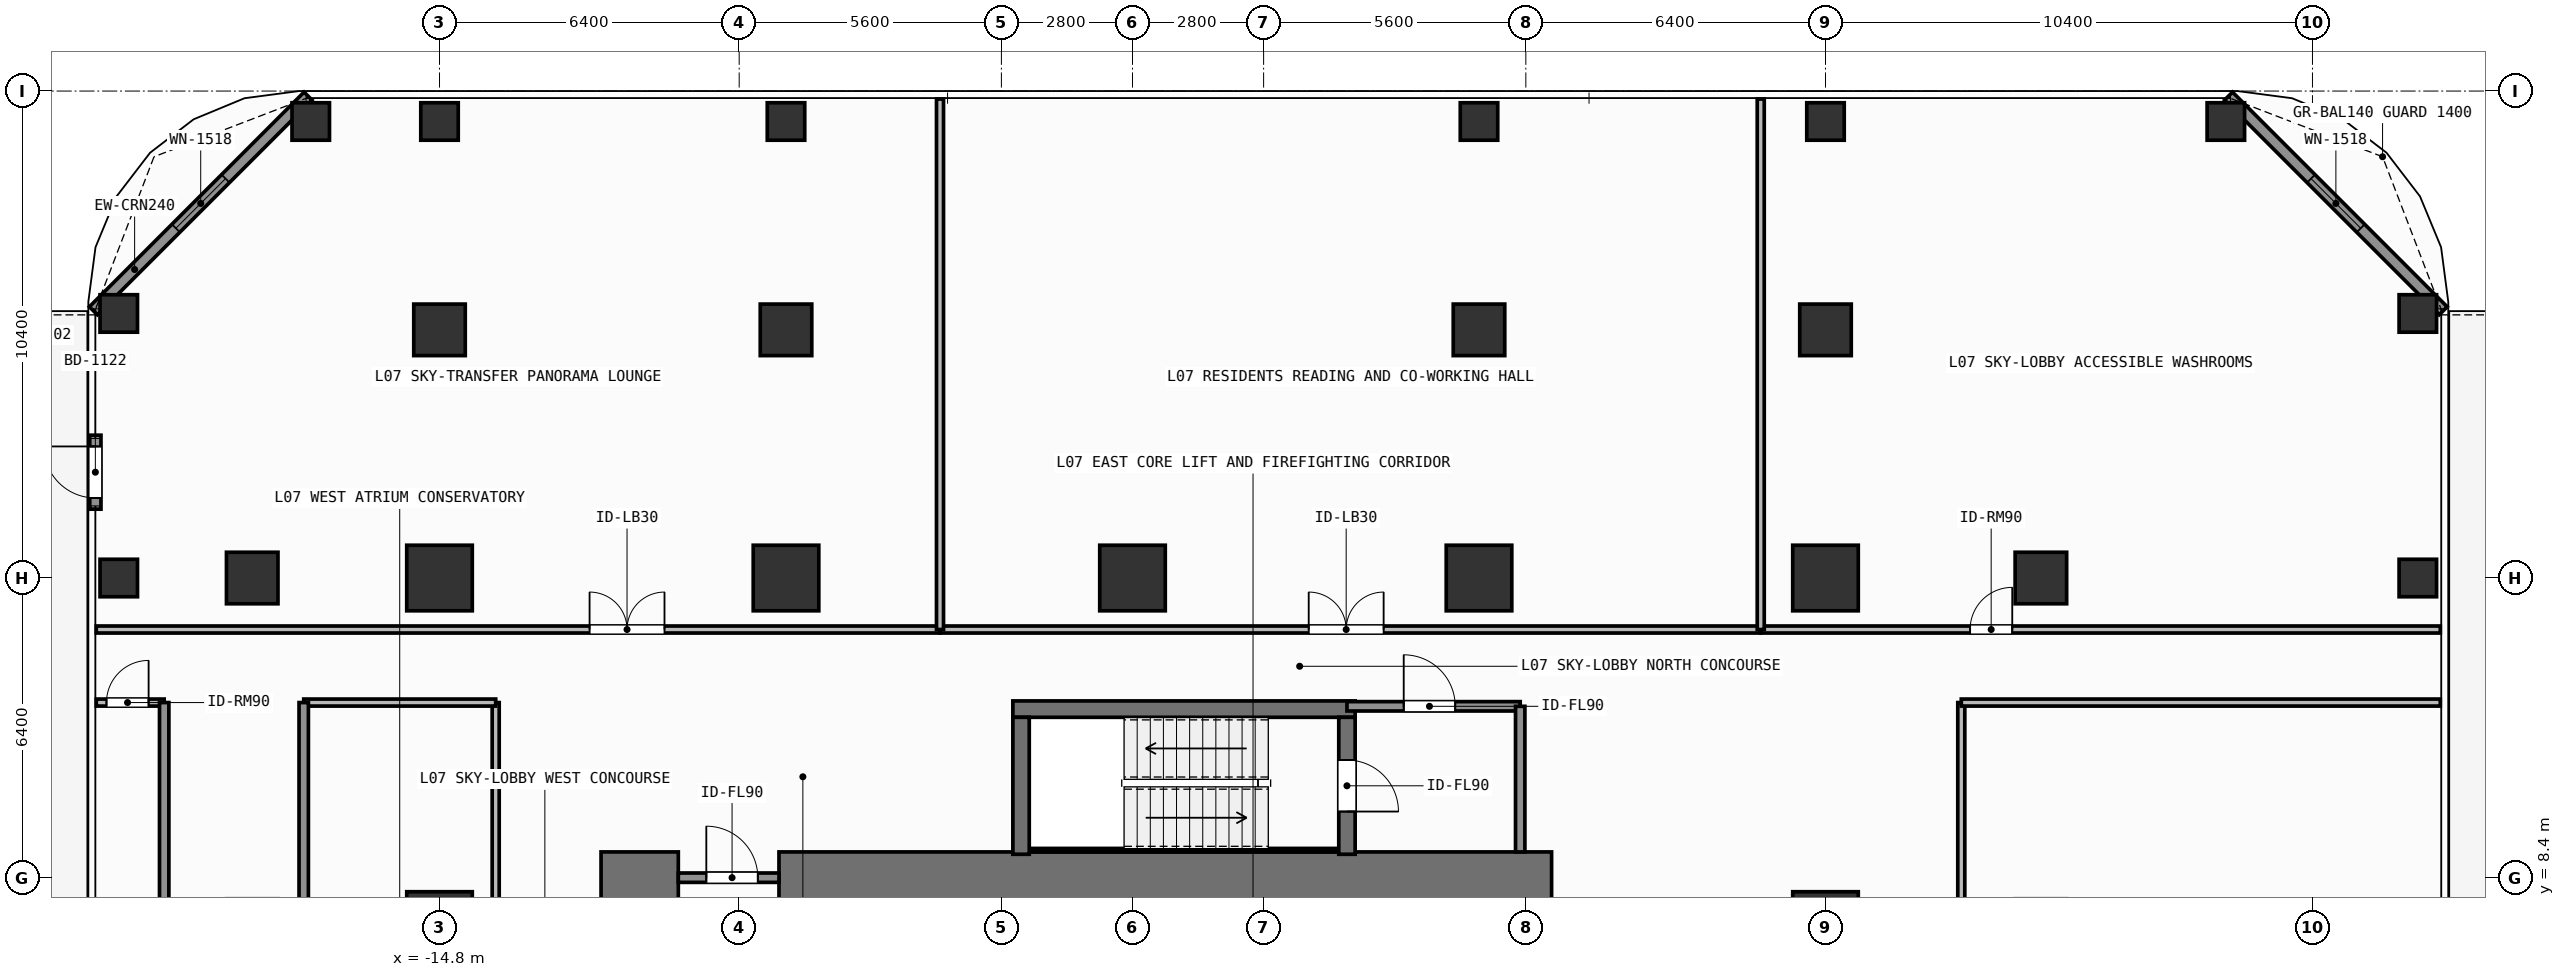
"""IFC4 building model, lengths in metres.
Left out: names, types, materials, properties, quantities, classifications, styles, units other than length and angle.
Written with IfcOpenShell. Run it as: python <this file> out.ifc"""

import sys

from ifc_helpers import new_model, si_unit, direction, frame, frame_2d, origin, origin_2d, place, context, subcontext, project, spatial, rectangle, hollow_rectangle, extrude, element, fill, save


model = new_model("IFC4")
c1 = context("Model", 3, precision=1e-05, world=origin(), true_north=direction((0.0, 1.0)))
c2 = subcontext(c1, "Body", "Model", "MODEL_VIEW")
j1 = project(units=[si_unit("LENGTHUNIT", "METRE"), si_unit("PLANEANGLEUNIT", "RADIAN")], contexts=[c1])
p1 = place(None, origin())
s1 = spatial("IfcSite", under=j1, at=p1, CompositionType="ELEMENT")
p2 = place(p1, origin())
s2 = spatial("IfcBuilding", under=s1, at=p2, CompositionType="ELEMENT")
p3 = place(p2, frame((0.0, 0.0, 26.4)))
s3 = spatial("IfcBuildingStorey", under=s2, at=p3, CompositionType="ELEMENT", Elevation=26.4)
p4 = place(p3, frame((-11.35, 8.4, 0.0), z_axis=(0.0, 0.0, 1.0), x_axis=(1.0, 0.0, 0.0)))
e1 = element("IfcWall", 1, at=p4, inside=s3, PredefinedType="SHEAR", context=c2, shape_type="SweptSolid", body=[
    extrude(rectangle(XDim=1.65, YDim=1.1, at=frame_2d((0.825, 0.0))), origin(), (0.0, 0.0, 1.0), 4.2),
])
p5 = place(p3, frame((-7.55, 8.4, 0.0), z_axis=(0.0, 0.0, 1.0), x_axis=(1.0, 0.0, 0.0)))
e2 = element("IfcWall", 2, at=p5, inside=s3, PredefinedType="SHEAR", context=c2, shape_type="SweptSolid", body=[
    extrude(rectangle(XDim=16.5, YDim=1.1, at=frame_2d((8.25, 0.0))), origin(), (0.0, 0.0, 1.0), 4.2),
])
p6 = place(p3, frame((-2.555, 12.0, 0.0), z_axis=(0.0, 0.0, 1.0), x_axis=(1.0, 0.0, 0.0)))
e3 = element("IfcWall", 3, at=p6, inside=s3, PredefinedType="SHEAR", context=c2, shape_type="SweptSolid", body=[
    extrude(rectangle(XDim=7.31, YDim=0.35, at=frame_2d((3.655, 0.0))), origin(), (0.0, 0.0, 1.0), 4.2),
])
p7 = place(p3, frame((-2.2, 8.988, 0.0), z_axis=(0.0, 0.0, 1.0), x_axis=(1.0, 0.0, 0.0)))
e4 = element("IfcWall", 4, at=p7, inside=s3, PredefinedType="SHEAR", context=c2, shape_type="SweptSolid", body=[
    extrude(rectangle(XDim=6.6, YDim=0.075, at=frame_2d((3.3, 0.0))), origin(), (0.0, 0.0, 1.0), 4.2),
])
p8 = place(p3, frame((-2.38, 8.9, 0.0), z_axis=(0.0, 0.0, 1.0), x_axis=(0.0, 1.0, 0.0)))
e5 = element("IfcWall", 5, at=p8, inside=s3, PredefinedType="SHEAR", context=c2, shape_type="SweptSolid", body=[
    extrude(rectangle(XDim=2.925, YDim=0.35, at=frame_2d((1.462, 0.0))), origin(), (0.0, 0.0, 1.0), 4.2),
])
p9 = place(p3, frame((4.58, 11.825, 0.0), z_axis=(0.0, 0.0, 1.0), x_axis=(0.0, -1.0, 0.0)))
e6 = element("IfcWall", 6, at=p9, inside=s3, PredefinedType="SHEAR", context=c2, shape_type="SweptSolid", body=[
    extrude(rectangle(XDim=2.925, YDim=0.35, at=frame_2d((1.462, 0.0))), origin(), (0.0, 0.0, 1.0), 4.2),
])
p10 = place(p9, frame((0.913, 0.0, 0.0)))
e7 = element("IfcOpeningElement", 7, at=p10, cuts=e6, PredefinedType="OPENING", context=c2, shape_type="SweptSolid", body=[
    extrude(rectangle(XDim=1.1, YDim=2.15, at=frame_2d((0.55, 1.075))), frame((0.0, 0.185, 0.0), z_axis=(0.0, -1.0, 0.0), x_axis=(1.0, 0.0, 0.0)), (0.0, 0.0, 1.0), 0.37),
])
for number, where, z_axis, x_axis in (
    (8, (-14.8, 14.8, 0.0), (0.0, 0.0, 1.0), (1.0, 0.0, 0.0)),
    (9, (-7.4, 14.8, 0.0), (0.0, 0.0, 1.0), (1.0, 0.0, 0.0)),
    (10, (0.0, 14.8, 0.0), (0.0, 0.0, 1.0), (1.0, 0.0, 0.0)),
    (11, (7.4, 14.8, 0.0), (0.0, 0.0, 1.0), (1.0, 0.0, 0.0)),
    (12, (14.8, 14.8, 0.0), (0.0, 0.0, 1.0), (1.0, 0.0, 0.0)),
    (13, (-14.8, 7.4, 0.0), (0.0, 0.0, 1.0), (1.0, 0.0, 0.0)),
    (14, (14.8, 7.4, 0.0), (0.0, 0.0, 1.0), (1.0, 0.0, 0.0)),
):
    element("IfcColumn", number, at=place(p3, frame(where, z_axis=z_axis, x_axis=x_axis)), inside=s3, PredefinedType="COLUMN", context=c2, shape_type="SweptSolid", body=[
        extrude(rectangle(XDim=1.4, YDim=1.4, at=origin_2d()), origin(), (0.0, 0.0, 1.0), 4.2),
    ])
for number, where, z_axis, x_axis in (
    (15, (-18.8, 14.8, 0.0), (0.0, 0.0, 1.0), (1.0, 0.0, 0.0)),
    (16, (19.4, 14.8, 0.0), (0.0, 0.0, 1.0), (1.0, 0.0, 0.0)),
    (17, (-14.8, 20.1, 0.0), (0.0, 0.0, 1.0), (1.0, 0.0, 0.0)),
    (18, (-7.4, 20.1, 0.0), (0.0, 0.0, 1.0), (1.0, 0.0, 0.0)),
    (19, (7.4, 20.1, 0.0), (0.0, 0.0, 1.0), (1.0, 0.0, 0.0)),
    (20, (14.8, 20.1, 0.0), (0.0, 0.0, 1.0), (1.0, 0.0, 0.0)),
):
    element("IfcColumn", number, at=place(p3, frame(where, z_axis=z_axis, x_axis=x_axis)), inside=s3, PredefinedType="COLUMN", context=c2, shape_type="SweptSolid", body=[
        extrude(rectangle(XDim=1.1, YDim=1.1, at=origin_2d()), origin(), (0.0, 0.0, 1.0), 4.2),
    ])
for number, where, z_axis, x_axis in (
    (21, (-17.55, 24.55, 0.0), (0.0, 0.0, 1.0), (1.0, 0.0, 0.0)),
    (22, (23.35, 24.55, 0.0), (0.0, 0.0, 1.0), (1.0, 0.0, 0.0)),
    (23, (-21.65, 20.45, 0.0), (0.0, 0.0, 1.0), (1.0, 0.0, 0.0)),
    (24, (27.45, 20.45, 0.0), (0.0, 0.0, 1.0), (1.0, 0.0, 0.0)),
    (25, (-14.8, 24.55, 0.0), (0.0, 0.0, 1.0), (1.0, 0.0, 0.0)),
    (26, (-7.4, 24.55, 0.0), (0.0, 0.0, 1.0), (1.0, 0.0, 0.0)),
    (27, (7.4, 24.55, 0.0), (0.0, 0.0, 1.0), (1.0, 0.0, 0.0)),
    (28, (14.8, 24.55, 0.0), (0.0, 0.0, 1.0), (1.0, 0.0, 0.0)),
    (29, (-21.65, 14.8, 0.0), (0.0, 0.0, 1.0), (1.0, 0.0, 0.0)),
    (30, (27.45, 14.8, 0.0), (0.0, 0.0, 1.0), (1.0, 0.0, 0.0)),
):
    element("IfcColumn", number, at=place(p3, frame(where, z_axis=z_axis, x_axis=x_axis)), inside=s3, PredefinedType="COLUMN", context=c2, shape_type="SweptSolid", body=[
        extrude(hollow_rectangle(XDim=0.8, YDim=0.8, WallThickness=0.036, at=origin_2d()), origin(), (0.0, 0.0, 1.0), 4.2),
    ])
p11 = place(p3, frame((-22.15, 16.27, 0.0), z_axis=(0.0, 0.0, 1.0), x_axis=(0.0, 1.0, 0.0)))
e31 = element("IfcWall", 31, at=p11, inside=s3, PredefinedType="SOLIDWALL", context=c2, shape_type="SweptSolid", body=[
    extrude(rectangle(XDim=1.58, YDim=0.24, at=frame_2d((0.79, 0.0))), origin(), (0.0, 0.0, 1.0), 3.98),
])
p12 = place(p11, frame((0.24, 0.0, 0.0)))
e32 = element("IfcOpeningElement", 32, at=p12, cuts=e31, PredefinedType="OPENING", context=c2, shape_type="SweptSolid", body=[
    extrude(rectangle(XDim=1.1, YDim=2.2, at=frame_2d((0.55, 1.1))), frame((0.0, 0.13, 0.0), z_axis=(0.0, -1.0, 0.0), x_axis=(1.0, 0.0, 0.0)), (0.0, 0.0, 1.0), 0.26),
])
p13 = place(p3, frame((-22.192, 20.508, 0.0), z_axis=(0.0, 0.0, 1.0), x_axis=(0.707106781187, 0.707106781187, 0.0)))
e33 = element("IfcWall", 33, at=p13, inside=s3, PredefinedType="SOLIDWALL", context=c2, shape_type="SweptSolid", body=[
    extrude(rectangle(XDim=6.484, YDim=0.24, at=frame_2d((3.242, 0.0))), origin(), (0.0, 0.0, 1.0), 3.98),
])
p14 = place(p13, frame((2.492, 0.0, 0.8)))
e34 = element("IfcOpeningElement", 34, at=p14, cuts=e33, PredefinedType="OPENING", context=c2, shape_type="SweptSolid", body=[
    extrude(rectangle(XDim=1.5, YDim=1.85, at=frame_2d((0.75, 0.925))), frame((0.0, 0.13, 0.0), z_axis=(0.0, -1.0, 0.0), x_axis=(1.0, 0.0, 0.0)), (0.0, 0.0, 1.0), 0.26),
])
p15 = place(p3, frame((23.408, 25.092, 0.0), z_axis=(0.0, 0.0, 1.0), x_axis=(0.707106781187, -0.707106781187, 0.0)))
e35 = element("IfcWall", 35, at=p15, inside=s3, PredefinedType="SOLIDWALL", context=c2, shape_type="SweptSolid", body=[
    extrude(rectangle(XDim=6.484, YDim=0.24, at=frame_2d((3.242, 0.0))), origin(), (0.0, 0.0, 1.0), 3.98),
])
p16 = place(p15, frame((2.492, 0.0, 0.8)))
e36 = element("IfcOpeningElement", 36, at=p16, cuts=e35, PredefinedType="OPENING", context=c2, shape_type="SweptSolid", body=[
    extrude(rectangle(XDim=1.5, YDim=1.85, at=frame_2d((0.75, 0.925))), frame((0.0, 0.13, 0.0), z_axis=(0.0, -1.0, 0.0), x_axis=(1.0, 0.0, 0.0)), (0.0, 0.0, 1.0), 0.26),
])
p17 = place(p3, frame((4.58, 12.06, 0.0), z_axis=(0.0, 0.0, 1.0), x_axis=(1.0, 0.0, 0.0)))
e37 = element("IfcWall", 37, at=p17, inside=s3, PredefinedType="SOLIDWALL", context=c2, shape_type="SweptSolid", body=[
    extrude(rectangle(XDim=3.7, YDim=0.2, at=frame_2d((1.85, 0.0))), origin(), (0.0, 0.0, 1.0), 3.98),
])
p18 = place(p17, frame((1.212, 0.0, 0.0)))
e38 = element("IfcOpeningElement", 38, at=p18, cuts=e37, PredefinedType="OPENING", context=c2, shape_type="SweptSolid", body=[
    extrude(rectangle(XDim=1.1, YDim=2.15, at=frame_2d((0.55, 1.075))), frame((0.0, 0.11, 0.0), z_axis=(0.0, -1.0, 0.0), x_axis=(1.0, 0.0, 0.0)), (0.0, 0.0, 1.0), 0.22),
])
p19 = place(p3, frame((-9.7, 8.4, 0.0), z_axis=(0.0, 0.0, 1.0), x_axis=(1.0, 0.0, 0.0)))
e39 = element("IfcWall", 39, at=p19, inside=s3, PredefinedType="SOLIDWALL", context=c2, shape_type="SweptSolid", body=[
    extrude(rectangle(XDim=2.15, YDim=0.2, at=frame_2d((1.075, 0.0))), origin(), (0.0, 0.0, 1.0), 3.02),
])
p20 = place(p19, frame((0.598, 0.0, 0.0)))
e40 = element("IfcOpeningElement", 40, at=p20, cuts=e39, PredefinedType="OPENING", context=c2, shape_type="SweptSolid", body=[
    extrude(rectangle(XDim=1.1, YDim=2.15, at=frame_2d((0.55, 1.075))), frame((0.0, 0.11, 0.0), z_axis=(0.0, -1.0, 0.0), x_axis=(1.0, 0.0, 0.0)), (0.0, 0.0, 1.0), 0.22),
])
p21 = place(p3, frame((-22.13, 13.7, 0.0), z_axis=(0.0, 0.0, 1.0), x_axis=(1.0, 0.0, 0.0)))
e41 = element("IfcWall", 41, at=p21, inside=s3, PredefinedType="PARTITIONING", context=c2, shape_type="SweptSolid", body=[
    extrude(rectangle(XDim=18.019, YDim=0.15, at=frame_2d((9.009, 0.0))), origin(), (0.0, 0.0, 1.0), 3.98),
])
p22 = place(p21, frame((10.535, 0.0, 0.0)))
e42 = element("IfcOpeningElement", 42, at=p22, cuts=e41, PredefinedType="OPENING", context=c2, shape_type="SweptSolid", body=[
    extrude(rectangle(XDim=1.6, YDim=2.3, at=frame_2d((0.8, 1.15))), frame((0.0, 0.085, 0.0), z_axis=(0.0, -1.0, 0.0), x_axis=(1.0, 0.0, 0.0)), (0.0, 0.0, 1.0), 0.17),
])
p23 = place(p3, frame((-4.111, 13.7, 0.0), z_axis=(0.0, 0.0, 1.0), x_axis=(1.0, 0.0, 0.0)))
e43 = element("IfcWall", 43, at=p23, inside=s3, PredefinedType="PARTITIONING", context=c2, shape_type="SweptSolid", body=[
    extrude(rectangle(XDim=17.528, YDim=0.15, at=frame_2d((8.764, 0.0))), origin(), (0.0, 0.0, 1.0), 3.98),
])
p24 = place(p23, frame((7.874, 0.0, 0.0)))
e44 = element("IfcOpeningElement", 44, at=p24, cuts=e43, PredefinedType="OPENING", context=c2, shape_type="SweptSolid", body=[
    extrude(rectangle(XDim=1.6, YDim=2.3, at=frame_2d((0.8, 1.15))), frame((0.0, 0.085, 0.0), z_axis=(0.0, -1.0, 0.0), x_axis=(1.0, 0.0, 0.0)), (0.0, 0.0, 1.0), 0.17),
])
p25 = place(p3, frame((13.417, 13.7, 0.0), z_axis=(0.0, 0.0, 1.0), x_axis=(1.0, 0.0, 0.0)))
e45 = element("IfcWall", 45, at=p25, inside=s3, PredefinedType="PARTITIONING", context=c2, shape_type="SweptSolid", body=[
    extrude(rectangle(XDim=14.513, YDim=0.15, at=frame_2d((7.256, 0.0))), origin(), (0.0, 0.0, 1.0), 3.98),
])
p26 = place(p25, frame((4.471, 0.0, 0.0)))
e46 = element("IfcOpeningElement", 46, at=p26, cuts=e45, PredefinedType="OPENING", context=c2, shape_type="SweptSolid", body=[
    extrude(rectangle(XDim=0.9, YDim=2.1, at=frame_2d((0.45, 1.05))), frame((0.0, 0.085, 0.0), z_axis=(0.0, -1.0, 0.0), x_axis=(1.0, 0.0, 0.0)), (0.0, 0.0, 1.0), 0.17),
])
p27 = place(p3, frame((-13.6, -12.14, 0.0), z_axis=(0.0, 0.0, 1.0), x_axis=(0.0, 1.0, 0.0)))
e47 = element("IfcWall", 47, at=p27, inside=s3, PredefinedType="PARTITIONING", context=c2, shape_type="SweptSolid", body=[
    extrude(rectangle(XDim=24.28, YDim=0.15, at=frame_2d((12.14, 0.0))), origin(), (0.0, 0.0, 1.0), 3.98),
])
p28 = place(p27, frame((11.25, 0.0, 0.0)))
e48 = element("IfcOpeningElement", 48, at=p28, cuts=e47, PredefinedType="OPENING", context=c2, shape_type="SweptSolid", body=[
    extrude(rectangle(XDim=1.6, YDim=2.3, at=frame_2d((0.8, 1.15))), frame((0.0, 0.085, 0.0), z_axis=(0.0, -1.0, 0.0), x_axis=(1.0, 0.0, 0.0)), (0.0, 0.0, 1.0), 0.17),
])
p29 = place(p3, frame((-22.13, 12.14, 0.0), z_axis=(0.0, 0.0, 1.0), x_axis=(1.0, 0.0, 0.0)))
e49 = element("IfcWall", 49, at=p29, inside=s3, PredefinedType="PARTITIONING", context=c2, shape_type="SweptSolid", body=[
    extrude(rectangle(XDim=1.45, YDim=0.15, at=frame_2d((0.725, 0.0))), origin(), (0.0, 0.0, 1.0), 3.98),
])
p30 = place(p29, frame((0.218, 0.0, 0.0)))
e50 = element("IfcOpeningElement", 50, at=p30, cuts=e49, PredefinedType="OPENING", context=c2, shape_type="SweptSolid", body=[
    extrude(rectangle(XDim=0.9, YDim=2.1, at=frame_2d((0.45, 1.05))), frame((0.0, 0.085, 0.0), z_axis=(0.0, -1.0, 0.0), x_axis=(1.0, 0.0, 0.0)), (0.0, 0.0, 1.0), 0.17),
])
p31 = place(p3, frame((17.7, -12.14, 0.0), z_axis=(0.0, 0.0, 1.0), x_axis=(0.0, 1.0, 0.0)))
e51 = element("IfcWall", 51, at=p31, inside=s3, PredefinedType="PARTITIONING", context=c2, shape_type="SweptSolid", body=[
    extrude(rectangle(XDim=24.28, YDim=0.15, at=frame_2d((12.14, 0.0))), origin(), (0.0, 0.0, 1.0), 3.98),
])
p32 = place(p31, frame((11.25, 0.0, 0.0)))
e52 = element("IfcOpeningElement", 52, at=p32, cuts=e51, PredefinedType="OPENING", context=c2, shape_type="SweptSolid", body=[
    extrude(rectangle(XDim=1.6, YDim=2.3, at=frame_2d((0.8, 1.15))), frame((0.0, 0.085, 0.0), z_axis=(0.0, -1.0, 0.0), x_axis=(1.0, 0.0, 0.0)), (0.0, 0.0, 1.0), 0.17),
])
p33 = place(p3, frame((8.28, 8.95, 0.0), z_axis=(0.0, 0.0, 1.0), x_axis=(0.0, 1.0, 0.0)))
e53 = element("IfcWall", 53, at=p33, inside=s3, PredefinedType="SOLIDWALL", context=c2, shape_type="SweptSolid", body=[
    extrude(rectangle(XDim=3.11, YDim=0.2, at=frame_2d((1.555, 0.0))), origin(), (0.0, 0.0, 1.0), 3.98),
])
for number, where, z_axis, x_axis in (
    (54, (-4.111, 13.7, 0.0), (0.0, 0.0, 1.0), (0.0, 1.0, 0.0)),
    (55, (13.417, 13.7, 0.0), (0.0, 0.0, 1.0), (0.0, 1.0, 0.0)),
):
    element("IfcWall", number, at=place(p3, frame(where, z_axis=z_axis, x_axis=x_axis)), inside=s3, PredefinedType="PARTITIONING", context=c2, shape_type="SweptSolid", body=[
        extrude(rectangle(XDim=11.33, YDim=0.15, at=frame_2d((5.665, 0.0))), origin(), (0.0, 0.0, 1.0), 3.98),
    ])
p34 = place(p3, frame((-17.7, 12.14, 0.0), z_axis=(0.0, 0.0, 1.0), x_axis=(1.0, 0.0, 0.0)))
e56 = element("IfcWall", 56, at=p34, inside=s3, PredefinedType="PARTITIONING", context=c2, shape_type="SweptSolid", body=[
    extrude(rectangle(XDim=4.1, YDim=0.15, at=frame_2d((2.05, 0.0))), origin(), (0.0, 0.0, 1.0), 3.98),
])
for number, where, z_axis, x_axis in (
    (57, (-17.7, -12.14, 0.0), (0.0, 0.0, 1.0), (0.0, 1.0, 0.0)),
    (58, (-20.68, -12.14, 0.0), (0.0, 0.0, 1.0), (0.0, 1.0, 0.0)),
):
    element("IfcWall", number, at=place(p3, frame(where, z_axis=z_axis, x_axis=x_axis)), inside=s3, PredefinedType="SOLIDWALL", context=c2, shape_type="SweptSolid", body=[
        extrude(rectangle(XDim=24.28, YDim=0.2, at=frame_2d((12.14, 0.0))), origin(), (0.0, 0.0, 1.0), 3.98),
    ])
p35 = place(p3, frame((17.7, 12.14, 0.0), z_axis=(0.0, 0.0, 1.0), x_axis=(1.0, 0.0, 0.0)))
e59 = element("IfcWall", 59, at=p35, inside=s3, PredefinedType="PARTITIONING", context=c2, shape_type="SweptSolid", body=[
    extrude(rectangle(XDim=10.23, YDim=0.15, at=frame_2d((5.115, 0.0))), origin(), (0.0, 0.0, 1.0), 3.98),
])
p36 = place(p12, origin())
e60 = element("IfcDoor", 60, at=p36, inside=s3, OperationType="SINGLE_SWING_RIGHT", PredefinedType="DOOR", context=c2, shape_type="SweptSolid", body=[
    extrude(rectangle(XDim=1.1, YDim=2.2, at=frame_2d((0.55, 1.1))), frame((0.0, 0.025, 0.0), z_axis=(0.0, -1.0, 0.0), x_axis=(1.0, 0.0, 0.0)), (0.0, 0.0, 1.0), 0.05),
])
fill(e32, e60)
p37 = place(p14, origin())
e61 = element("IfcWindow", 61, at=p37, inside=s3, PartitioningType="SINGLE_PANEL", PredefinedType="WINDOW", context=c2, shape_type="SweptSolid", body=[
    extrude(rectangle(XDim=1.5, YDim=1.85, at=frame_2d((0.75, 0.925))), frame((0.0, 0.03, 0.0), z_axis=(0.0, -1.0, 0.0), x_axis=(1.0, 0.0, 0.0)), (0.0, 0.0, 1.0), 0.06),
])
fill(e34, e61)
p38 = place(p16, origin())
e62 = element("IfcWindow", 62, at=p38, inside=s3, PartitioningType="SINGLE_PANEL", PredefinedType="WINDOW", context=c2, shape_type="SweptSolid", body=[
    extrude(rectangle(XDim=1.5, YDim=1.85, at=frame_2d((0.75, 0.925))), frame((0.0, 0.03, 0.0), z_axis=(0.0, -1.0, 0.0), x_axis=(1.0, 0.0, 0.0)), (0.0, 0.0, 1.0), 0.06),
])
fill(e36, e62)
p39 = place(p10, origin())
e63 = element("IfcDoor", 63, at=p39, inside=s3, OperationType="SINGLE_SWING_RIGHT", PredefinedType="DOOR", context=c2, shape_type="SweptSolid", body=[
    extrude(rectangle(XDim=1.1, YDim=2.15, at=frame_2d((0.55, 1.075))), frame((0.0, 0.025, 0.0), z_axis=(0.0, -1.0, 0.0), x_axis=(1.0, 0.0, 0.0)), (0.0, 0.0, 1.0), 0.05),
])
fill(e7, e63)
p40 = place(p18, origin())
e64 = element("IfcDoor", 64, at=p40, inside=s3, OperationType="SINGLE_SWING_LEFT", PredefinedType="DOOR", context=c2, shape_type="SweptSolid", body=[
    extrude(rectangle(XDim=1.1, YDim=2.15, at=frame_2d((0.55, 1.075))), frame((0.0, 0.025, 0.0), z_axis=(0.0, -1.0, 0.0), x_axis=(1.0, 0.0, 0.0)), (0.0, 0.0, 1.0), 0.05),
])
fill(e38, e64)
p41 = place(p20, origin())
e65 = element("IfcDoor", 65, at=p41, inside=s3, OperationType="SINGLE_SWING_LEFT", PredefinedType="DOOR", context=c2, shape_type="SweptSolid", body=[
    extrude(rectangle(XDim=1.1, YDim=2.15, at=frame_2d((0.55, 1.075))), frame((0.0, 0.025, 0.0), z_axis=(0.0, -1.0, 0.0), x_axis=(1.0, 0.0, 0.0)), (0.0, 0.0, 1.0), 0.05),
])
fill(e40, e65)
p42 = place(p22, origin())
e66 = element("IfcDoor", 66, at=p42, inside=s3, OperationType="SINGLE_SWING_LEFT", PredefinedType="DOOR", context=c2, shape_type="SweptSolid", body=[
    extrude(rectangle(XDim=1.6, YDim=2.3, at=frame_2d((0.8, 1.15))), frame((0.0, 0.025, 0.0), z_axis=(0.0, -1.0, 0.0), x_axis=(1.0, 0.0, 0.0)), (0.0, 0.0, 1.0), 0.05),
])
fill(e42, e66)
p43 = place(p24, origin())
e67 = element("IfcDoor", 67, at=p43, inside=s3, OperationType="SINGLE_SWING_LEFT", PredefinedType="DOOR", context=c2, shape_type="SweptSolid", body=[
    extrude(rectangle(XDim=1.6, YDim=2.3, at=frame_2d((0.8, 1.15))), frame((0.0, 0.025, 0.0), z_axis=(0.0, -1.0, 0.0), x_axis=(1.0, 0.0, 0.0)), (0.0, 0.0, 1.0), 0.05),
])
fill(e44, e67)
p44 = place(p26, origin())
e68 = element("IfcDoor", 68, at=p44, inside=s3, OperationType="SINGLE_SWING_RIGHT", PredefinedType="DOOR", context=c2, shape_type="SweptSolid", body=[
    extrude(rectangle(XDim=0.9, YDim=2.1, at=frame_2d((0.45, 1.05))), frame((0.0, 0.025, 0.0), z_axis=(0.0, -1.0, 0.0), x_axis=(1.0, 0.0, 0.0)), (0.0, 0.0, 1.0), 0.05),
])
fill(e46, e68)
p45 = place(p30, origin())
e69 = element("IfcDoor", 69, at=p45, inside=s3, OperationType="SINGLE_SWING_RIGHT", PredefinedType="DOOR", context=c2, shape_type="SweptSolid", body=[
    extrude(rectangle(XDim=0.9, YDim=2.1, at=frame_2d((0.45, 1.05))), frame((0.0, 0.025, 0.0), z_axis=(0.0, -1.0, 0.0), x_axis=(1.0, 0.0, 0.0)), (0.0, 0.0, 1.0), 0.05),
])
fill(e50, e69)
save(model, sys.argv[1])
